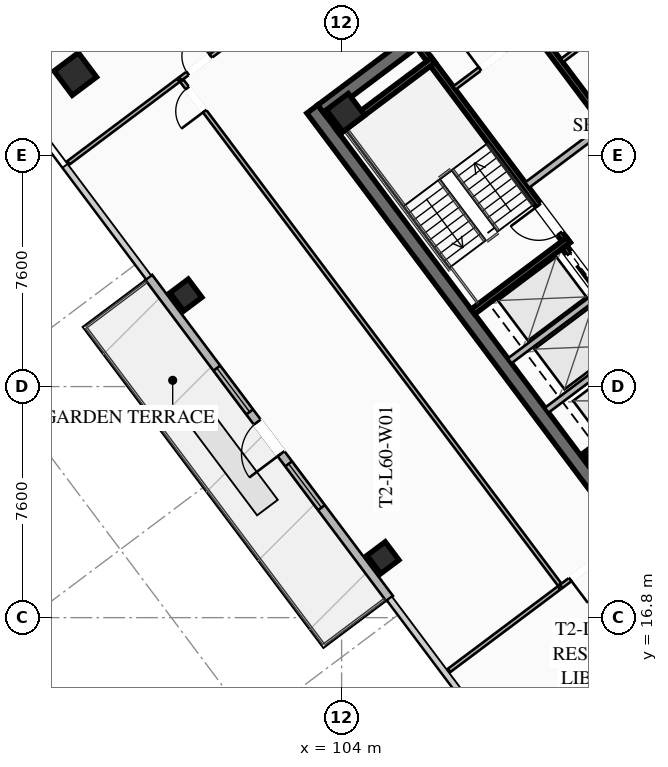
"""IFC4 building model, lengths in metres.
Left out: names, types, materials, properties, quantities, classifications, styles, units other than length and angle.
Written with IfcOpenShell. Run it as: python <this file> out.ifc"""

import sys

from ifc_helpers import new_model, si_unit, direction, frame, frame_2d, origin, origin_2d, place, context, subcontext, project, spatial, rectangle, hollow_rectangle, extrude, element, fill, save


model = new_model("IFC4")
c1 = context("Model", 3, precision=1e-05, world=origin(), true_north=direction((0.0, 1.0)))
c2 = subcontext(c1, "Body", "Model", "MODEL_VIEW")
j1 = project(units=[si_unit("LENGTHUNIT", "METRE"), si_unit("PLANEANGLEUNIT", "RADIAN")], contexts=[c1])
p1 = place(None, origin())
s1 = spatial("IfcSite", under=j1, at=p1, CompositionType="ELEMENT")
p2 = place(p1, origin())
s2 = spatial("IfcBuilding", under=s1, at=p2, CompositionType="ELEMENT")
p3 = place(p2, frame((0.0, 0.0, 221.95)))
s3 = spatial("IfcBuildingStorey", under=s2, at=p3, CompositionType="ELEMENT", Elevation=221.95)
p4 = place(p3, frame((112.396, 21.047, 0.0), z_axis=(0.0, 0.0, 1.0), x_axis=(-0.600005007985, 0.799996243986, 0.0)))
e1 = element("IfcWall", 1, at=p4, inside=s3, PredefinedType="SHEAR", context=c2, shape_type="SweptSolid", body=[
    extrude(rectangle(XDim=15.6, YDim=0.45, at=frame_2d((7.8, 0.0))), origin(), (0.0, 0.0, 1.0), 3.55),
])
p5 = place(p3, frame((103.351, 33.482, 0.0), z_axis=(0.0, 0.0, 1.0), x_axis=(0.8, 0.6, 0.0)))
e2 = element("IfcWall", 2, at=p5, inside=s3, PredefinedType="SHEAR", context=c2, shape_type="SweptSolid", body=[
    extrude(rectangle(XDim=15.26, YDim=0.45, at=frame_2d((7.63, 0.0))), origin(), (0.0, 0.0, 1.0), 3.55),
])
p6 = place(p5, frame((4.68, 0.0, 0.0)))
e3 = element("IfcOpeningElement", 3, at=p6, cuts=e2, PredefinedType="OPENING", context=c2, shape_type="SweptSolid", body=[
    extrude(rectangle(XDim=1.25, YDim=2.25, at=frame_2d((0.625, 1.125))), frame((0.0, 0.235, 0.0), z_axis=(0.0, -1.0, 0.0), x_axis=(1.0, 0.0, 0.0)), (0.0, 0.0, 1.0), 0.47),
])
p7 = place(p5, frame((9.73, 0.0, 0.0)))
e4 = element("IfcOpeningElement", 4, at=p7, cuts=e2, PredefinedType="OPENING", context=c2, shape_type="SweptSolid", body=[
    extrude(rectangle(XDim=1.25, YDim=2.25, at=frame_2d((0.625, 1.125))), frame((0.0, 0.235, 0.0), z_axis=(0.0, -1.0, 0.0), x_axis=(1.0, 0.0, 0.0)), (0.0, 0.0, 1.0), 0.47),
])
for number, where, z_axis, x_axis in (
    (5, (112.59, 22.13, 0.0), (0.0, 0.0, 1.0), (0.8, 0.6, 0.0)),
    (6, (104.13, 33.41, 0.0), (0.0, 0.0, 1.0), (0.8, 0.6, 0.0)),
):
    element("IfcColumn", number, at=place(p3, frame(where, z_axis=z_axis, x_axis=x_axis)), inside=s3, PredefinedType="COLUMN", context=c2, shape_type="SweptSolid", body=[
        extrude(hollow_rectangle(XDim=0.9, YDim=0.9, WallThickness=0.04, at=origin_2d()), origin(), (0.0, 0.0, 1.0), 3.37),
    ])
p8 = place(p3, frame((95.24, 34.68, 0.0), z_axis=(0.0, 0.0, 1.0), x_axis=(0.799999996291, 0.600000004945, 0.0)))
e7 = element("IfcColumn", 7, at=p8, inside=s3, PredefinedType="COLUMN", context=c2, shape_type="SweptSolid", body=[
    extrude(hollow_rectangle(XDim=1.0, YDim=1.0, WallThickness=0.04, at=origin_2d()), origin(), (0.0, 0.0, 1.0), 3.37),
])
for number, where, z_axis, x_axis in (
    (8, (98.88, 27.41, 0.0), (0.0, 0.0, 1.0), (0.8, 0.6, 0.0)),
    (9, (105.36, 18.77, 0.0), (0.0, 0.0, 1.0), (0.8, 0.6, 0.0)),
):
    element("IfcColumn", number, at=place(p3, frame(where, z_axis=z_axis, x_axis=x_axis)), inside=s3, PredefinedType="COLUMN", context=c2, shape_type="SweptSolid", body=[
        extrude(hollow_rectangle(XDim=0.75, YDim=0.75, WallThickness=0.032, at=origin_2d()), origin(), (0.0, 0.0, 1.0), 3.37),
    ])
p9 = place(p3, frame((105.576, 17.432, 0.0), z_axis=(0.0, 0.0, 1.0), x_axis=(-0.599994081423, 0.800004438899, 0.0)))
e10 = element("IfcWall", 10, at=p9, inside=s3, PredefinedType="SOLIDWALL", context=c2, shape_type="SweptSolid", body=[
    extrude(rectangle(XDim=13.2, YDim=0.28, at=frame_2d((6.6, 0.0))), origin(), (0.0, 0.0, 1.0), 3.37),
])
p10 = place(p9, frame((5.95, 0.0, 0.0)))
e11 = element("IfcOpeningElement", 11, at=p10, cuts=e10, PredefinedType="OPENING", context=c2, shape_type="SweptSolid", body=[
    extrude(rectangle(XDim=1.3, YDim=2.15, at=frame_2d((0.65, 1.075))), frame((0.0, 0.15, 0.0), z_axis=(0.0, -1.0, 0.0), x_axis=(1.0, 0.0, 0.0)), (0.0, 0.0, 1.0), 0.3),
])
p11 = place(p9, frame((3.732, 0.0, 0.85)))
e12 = element("IfcOpeningElement", 12, at=p11, cuts=e10, PredefinedType="OPENING", context=c2, shape_type="SweptSolid", body=[
    extrude(rectangle(XDim=1.8, YDim=1.92, at=frame_2d((0.9, 0.96))), frame((0.0, 0.15, 0.0), z_axis=(0.0, -1.0, 0.0), x_axis=(1.0, 0.0, 0.0)), (0.0, 0.0, 1.0), 0.3),
])
p12 = place(p9, frame((7.668, 0.0, 0.85)))
e13 = element("IfcOpeningElement", 13, at=p12, cuts=e10, PredefinedType="OPENING", context=c2, shape_type="SweptSolid", body=[
    extrude(rectangle(XDim=1.8, YDim=1.92, at=frame_2d((0.9, 0.96))), frame((0.0, 0.15, 0.0), z_axis=(0.0, -1.0, 0.0), x_axis=(1.0, 0.0, 0.0)), (0.0, 0.0, 1.0), 0.3),
])
p13 = place(p3, frame((111.44, 29.08, 0.0), z_axis=(0.0, 0.0, 1.0), x_axis=(-0.59999041401, 0.800007189403, 0.0)))
e14 = element("IfcWall", 14, at=p13, inside=s3, PredefinedType="SHEAR", context=c2, shape_type="SweptSolid", body=[
    extrude(rectangle(XDim=8.15, YDim=0.2, at=frame_2d((4.075, 0.0))), origin(), (0.0, 0.0, 1.0), 3.37),
])
p14 = place(p13, frame((0.45, 0.0, 0.0)))
e15 = element("IfcOpeningElement", 15, at=p14, cuts=e14, PredefinedType="OPENING", context=c2, shape_type="SweptSolid", body=[
    extrude(rectangle(XDim=1.15, YDim=2.2, at=frame_2d((0.575, 1.1))), frame((0.0, 0.11, 0.0), z_axis=(0.0, -1.0, 0.0), x_axis=(1.0, 0.0, 0.0)), (0.0, 0.0, 1.0), 0.22),
])
for number, where, z_axis, x_axis in (
    (16, (108.316, 26.862, 0.0), (0.0, 0.0, 1.0), (0.8, 0.6, 0.0)),
    (17, (103.876, 32.782, 0.0), (0.0, 0.0, 1.0), (0.8, 0.6, 0.0)),
):
    element("IfcWall", number, at=place(p3, frame(where, z_axis=z_axis, x_axis=x_axis)), inside=s3, PredefinedType="SHEAR", context=c2, shape_type="SweptSolid", body=[
        extrude(rectangle(XDim=3.93, YDim=0.2, at=frame_2d((1.965, 0.0))), origin(), (0.0, 0.0, 1.0), 3.37),
    ])
p15 = place(p3, frame((118.058, 25.856, 0.0), z_axis=(0.0, 0.0, 1.0), x_axis=(-0.600002657301, 0.799998007018, 0.0)))
e18 = element("IfcWall", 18, at=p15, inside=s3, PredefinedType="SHEAR", context=c2, shape_type="SweptSolid", body=[
    extrude(rectangle(XDim=14.7, YDim=0.2, at=frame_2d((7.35, 0.0))), origin(), (0.0, 0.0, 1.0), 3.37),
])
p16 = place(p3, frame((110.104, 31.028, 0.0), z_axis=(0.0, 0.0, 1.0), x_axis=(0.800018601094, 0.59997519774, 0.0)))
e19 = element("IfcWall", 19, at=p16, inside=s3, PredefinedType="SOLIDWALL", context=c2, shape_type="SweptSolid", body=[
    extrude(rectangle(XDim=3.15, YDim=0.22, at=frame_2d((1.575, 0.0))), origin(), (0.0, 0.0, 1.0), 2.723),
])
p17 = place(p3, frame((115.25, 23.75, 0.0), z_axis=(0.0, 0.0, 1.0), x_axis=(-0.599994036198, 0.800004472816, 0.0)))
e20 = element("IfcWall", 20, at=p17, inside=s3, PredefinedType="SHEAR", context=c2, shape_type="SweptSolid", body=[
    extrude(rectangle(XDim=6.55, YDim=0.2, at=frame_2d((3.275, 0.0))), origin(), (0.0, 0.0, 1.0), 3.37),
])
p18 = place(p17, frame((4.975, 0.0, 0.0)))
e21 = element("IfcOpeningElement", 21, at=p18, cuts=e20, PredefinedType="OPENING", context=c2, shape_type="SweptSolid", body=[
    extrude(rectangle(XDim=1.3, YDim=2.25, at=frame_2d((0.65, 1.125))), frame((0.0, 0.11, 0.0), z_axis=(0.0, -1.0, 0.0), x_axis=(1.0, 0.0, 0.0)), (0.0, 0.0, 1.0), 0.22),
])
p19 = place(p17, frame((2.975, 0.0, 0.0)))
e22 = element("IfcOpeningElement", 22, at=p19, cuts=e20, PredefinedType="OPENING", context=c2, shape_type="SweptSolid", body=[
    extrude(rectangle(XDim=1.3, YDim=2.25, at=frame_2d((0.65, 1.125))), frame((0.0, 0.11, 0.0), z_axis=(0.0, -1.0, 0.0), x_axis=(1.0, 0.0, 0.0)), (0.0, 0.0, 1.0), 0.22),
])
p20 = place(p17, frame((0.775, 0.0, 0.0)))
e23 = element("IfcOpeningElement", 23, at=p20, cuts=e20, PredefinedType="OPENING", context=c2, shape_type="SweptSolid", body=[
    extrude(rectangle(XDim=1.3, YDim=2.25, at=frame_2d((0.65, 1.125))), frame((0.0, 0.11, 0.0), z_axis=(0.0, -1.0, 0.0), x_axis=(1.0, 0.0, 0.0)), (0.0, 0.0, 1.0), 0.22),
])
for number, where, z_axis, x_axis in (
    (24, (110.746, 23.622, 0.0), (0.0, 0.0, 1.0), (0.8, 0.6, 0.0)),
    (25, (109.528, 25.246, 0.0), (0.0, 0.0, 1.0), (0.8, 0.6, 0.0)),
):
    element("IfcWall", number, at=place(p3, frame(where, z_axis=z_axis, x_axis=x_axis)), inside=s3, PredefinedType="SOLIDWALL", context=c2, shape_type="SweptSolid", body=[
        extrude(rectangle(XDim=3.58, YDim=0.2, at=frame_2d((1.79, 0.0))), origin(), (0.0, 0.0, 1.0), 3.37),
    ])
p21 = place(p3, frame((107.71, 34.22, 0.0), z_axis=(0.0, 0.0, 1.0), x_axis=(0.799981399002, 0.60002480053, 0.0)))
e26 = element("IfcWall", 26, at=p21, inside=s3, PredefinedType="PARTITIONING", context=c2, shape_type="SweptSolid", body=[
    extrude(rectangle(XDim=3.15, YDim=0.135, at=frame_2d((1.575, 0.0))), origin(), (0.0, 0.0, 1.0), 2.723),
])
p22 = place(p21, frame((1.05, 0.0, 0.0)))
e27 = element("IfcOpeningElement", 27, at=p22, cuts=e26, PredefinedType="OPENING", context=c2, shape_type="SweptSolid", body=[
    extrude(rectangle(XDim=1.05, YDim=2.2, at=frame_2d((0.525, 1.1))), frame((0.0, 0.077, 0.0), z_axis=(0.0, -1.0, 0.0), x_axis=(1.0, 0.0, 0.0)), (0.0, 0.0, 1.0), 0.155),
])
p23 = place(p3, frame((115.11, 33.27, 0.0), z_axis=(0.0, 0.0, 1.0), x_axis=(-0.600011160345, 0.79999162962, 0.0)))
e28 = element("IfcWall", 28, at=p23, inside=s3, PredefinedType="SOLIDWALL", context=c2, shape_type="SweptSolid", body=[
    extrude(rectangle(XDim=7.0, YDim=0.2, at=frame_2d((3.5, 0.0))), origin(), (0.0, 0.0, 1.0), 2.723),
])
p24 = place(p23, frame((0.85, 0.0, 0.0)))
e29 = element("IfcOpeningElement", 29, at=p24, cuts=e28, PredefinedType="OPENING", context=c2, shape_type="SweptSolid", body=[
    extrude(rectangle(XDim=0.95, YDim=2.05, at=frame_2d((0.475, 1.025))), frame((0.0, 0.11, 0.0), z_axis=(0.0, -1.0, 0.0), x_axis=(1.0, 0.0, 0.0)), (0.0, 0.0, 1.0), 0.22),
])
p25 = place(p23, frame((4.85, 0.0, 0.0)))
e30 = element("IfcOpeningElement", 30, at=p25, cuts=e28, PredefinedType="OPENING", context=c2, shape_type="SweptSolid", body=[
    extrude(rectangle(XDim=0.95, YDim=2.05, at=frame_2d((0.475, 1.025))), frame((0.0, 0.11, 0.0), z_axis=(0.0, -1.0, 0.0), x_axis=(1.0, 0.0, 0.0)), (0.0, 0.0, 1.0), 0.22),
])
p26 = place(p3, frame((111.246, 35.122, 0.0), z_axis=(0.0, 0.0, 1.0), x_axis=(0.8, 0.6, 0.0)))
e31 = element("IfcWall", 31, at=p26, inside=s3, PredefinedType="PARTITIONING", context=c2, shape_type="SweptSolid", body=[
    extrude(rectangle(XDim=1.88, YDim=0.135, at=frame_2d((0.94, 0.0))), origin(), (0.0, 0.0, 1.0), 2.723),
])
p27 = place(p3, frame((98.696, 34.522, 0.0), z_axis=(0.0, 0.0, 1.0), x_axis=(0.799998778269, 0.600001628972, 0.0)))
e32 = element("IfcWall", 32, at=p27, inside=s3, PredefinedType="PARTITIONING", context=c2, shape_type="SweptSolid", body=[
    extrude(rectangle(XDim=23.98, YDim=0.135, at=frame_2d((11.99, 0.0))), origin(), (0.0, 0.0, 1.0), 2.723),
])
p28 = place(p27, frame((0.3, 0.0, 0.0)))
e33 = element("IfcOpeningElement", 33, at=p28, cuts=e32, PredefinedType="OPENING", context=c2, shape_type="SweptSolid", body=[
    extrude(rectangle(XDim=0.95, YDim=2.05, at=frame_2d((0.475, 1.025))), frame((0.0, 0.077, 0.0), z_axis=(0.0, -1.0, 0.0), x_axis=(1.0, 0.0, 0.0)), (0.0, 0.0, 1.0), 0.155),
])
p29 = place(p27, frame((10.503, 0.0, 0.0)))
e34 = element("IfcOpeningElement", 34, at=p29, cuts=e32, PredefinedType="OPENING", context=c2, shape_type="SweptSolid", body=[
    extrude(rectangle(XDim=0.95, YDim=2.05, at=frame_2d((0.475, 1.025))), frame((0.0, 0.077, 0.0), z_axis=(0.0, -1.0, 0.0), x_axis=(1.0, 0.0, 0.0)), (0.0, 0.0, 1.0), 0.155),
])
p30 = place(p27, frame((14.308, 0.0, 0.0)))
e35 = element("IfcOpeningElement", 35, at=p30, cuts=e32, PredefinedType="OPENING", context=c2, shape_type="SweptSolid", body=[
    extrude(rectangle(XDim=0.95, YDim=2.05, at=frame_2d((0.475, 1.025))), frame((0.0, 0.077, 0.0), z_axis=(0.0, -1.0, 0.0), x_axis=(1.0, 0.0, 0.0)), (0.0, 0.0, 1.0), 0.155),
])
p31 = place(p27, frame((22.73, 0.0, 0.0)))
e36 = element("IfcOpeningElement", 36, at=p31, cuts=e32, PredefinedType="OPENING", context=c2, shape_type="SweptSolid", body=[
    extrude(rectangle(XDim=0.95, YDim=2.05, at=frame_2d((0.475, 1.025))), frame((0.0, 0.077, 0.0), z_axis=(0.0, -1.0, 0.0), x_axis=(1.0, 0.0, 0.0)), (0.0, 0.0, 1.0), 0.155),
])
p32 = place(p3, frame((123.322, 26.904, 0.0), z_axis=(0.0, 0.0, 1.0), x_axis=(-0.799996127317, -0.600005163543, 0.0)))
e37 = element("IfcWall", 37, at=p32, inside=s3, PredefinedType="PARTITIONING", context=c2, shape_type="SweptSolid", body=[
    extrude(rectangle(XDim=15.13, YDim=0.135, at=frame_2d((7.565, 0.0))), origin(), (0.0, 0.0, 1.0), 2.723),
])
p33 = place(p32, frame((13.8, 0.0, 0.0)))
e38 = element("IfcOpeningElement", 38, at=p33, cuts=e37, PredefinedType="OPENING", context=c2, shape_type="SweptSolid", body=[
    extrude(rectangle(XDim=0.95, YDim=2.05, at=frame_2d((0.475, 1.025))), frame((0.0, 0.077, 0.0), z_axis=(0.0, -1.0, 0.0), x_axis=(1.0, 0.0, 0.0)), (0.0, 0.0, 1.0), 0.155),
])
p34 = place(p32, frame((3.672, 0.0, 0.0)))
e39 = element("IfcOpeningElement", 39, at=p34, cuts=e37, PredefinedType="OPENING", context=c2, shape_type="SweptSolid", body=[
    extrude(rectangle(XDim=0.95, YDim=2.05, at=frame_2d((0.475, 1.025))), frame((0.0, 0.077, 0.0), z_axis=(0.0, -1.0, 0.0), x_axis=(1.0, 0.0, 0.0)), (0.0, 0.0, 1.0), 0.155),
])
p35 = place(p3, frame((111.17, 17.89, 0.0), z_axis=(0.0, 0.0, 1.0), x_axis=(-0.599998113842, 0.800001414615, 0.0)))
e40 = element("IfcWall", 40, at=p35, inside=s3, PredefinedType="PARTITIONING", context=c2, shape_type="SweptSolid", body=[
    extrude(rectangle(XDim=20.71, YDim=0.135, at=frame_2d((10.355, 0.0))), origin(), (0.0, 0.0, 1.0), 2.723),
])
p36 = place(p35, frame((19.46, 0.0, 0.0)))
e41 = element("IfcOpeningElement", 41, at=p36, cuts=e40, PredefinedType="OPENING", context=c2, shape_type="SweptSolid", body=[
    extrude(rectangle(XDim=0.95, YDim=2.05, at=frame_2d((0.475, 1.025))), frame((0.0, 0.077, 0.0), z_axis=(0.0, -1.0, 0.0), x_axis=(1.0, 0.0, 0.0)), (0.0, 0.0, 1.0), 0.155),
])
for number, where, z_axis, x_axis in (
    (42, (98.632, 34.474, 0.0), (0.0, 0.0, 1.0), (-0.8, -0.6, 0.0)),
    (43, (107.538, 15.066, 0.0), (0.0, 0.0, 1.0), (0.8, 0.6, 0.0)),
):
    element("IfcWall", number, at=place(p3, frame(where, z_axis=z_axis, x_axis=x_axis)), inside=s3, PredefinedType="PARTITIONING", context=c2, shape_type="SweptSolid", body=[
        extrude(rectangle(XDim=4.52, YDim=0.135, at=frame_2d((2.26, 0.0))), origin(), (0.0, 0.0, 1.0), 2.723),
    ])
p37 = place(p10, origin())
e44 = element("IfcDoor", 44, at=p37, inside=s3, OperationType="SINGLE_SWING_LEFT", PredefinedType="DOOR", context=c2, shape_type="SweptSolid", body=[
    extrude(rectangle(XDim=1.3, YDim=2.15, at=frame_2d((0.65, 1.075))), frame((0.0, 0.025, 0.0), z_axis=(0.0, -1.0, 0.0), x_axis=(1.0, 0.0, 0.0)), (0.0, 0.0, 1.0), 0.05),
])
fill(e11, e44)
p38 = place(p11, origin())
e45 = element("IfcWindow", 45, at=p38, inside=s3, PartitioningType="SINGLE_PANEL", PredefinedType="WINDOW", context=c2, shape_type="SweptSolid", body=[
    extrude(rectangle(XDim=1.8, YDim=1.92, at=frame_2d((0.9, 0.96))), frame((0.0, 0.03, 0.0), z_axis=(0.0, -1.0, 0.0), x_axis=(1.0, 0.0, 0.0)), (0.0, 0.0, 1.0), 0.06),
])
fill(e12, e45)
p39 = place(p12, origin())
e46 = element("IfcWindow", 46, at=p39, inside=s3, PartitioningType="SINGLE_PANEL", PredefinedType="WINDOW", context=c2, shape_type="SweptSolid", body=[
    extrude(rectangle(XDim=1.8, YDim=1.92, at=frame_2d((0.9, 0.96))), frame((0.0, 0.03, 0.0), z_axis=(0.0, -1.0, 0.0), x_axis=(1.0, 0.0, 0.0)), (0.0, 0.0, 1.0), 0.06),
])
fill(e13, e46)
p40 = place(p14, origin())
e47 = element("IfcDoor", 47, at=p40, inside=s3, OperationType="SINGLE_SWING_RIGHT", PredefinedType="DOOR", context=c2, shape_type="SweptSolid", body=[
    extrude(rectangle(XDim=1.15, YDim=2.2, at=frame_2d((0.575, 1.1))), frame((0.0, 0.025, 0.0), z_axis=(0.0, -1.0, 0.0), x_axis=(1.0, 0.0, 0.0)), (0.0, 0.0, 1.0), 0.05),
])
fill(e15, e47)
p41 = place(p22, origin())
e48 = element("IfcDoor", 48, at=p41, inside=s3, OperationType="SINGLE_SWING_LEFT", PredefinedType="DOOR", context=c2, shape_type="SweptSolid", body=[
    extrude(rectangle(XDim=1.05, YDim=2.2, at=frame_2d((0.525, 1.1))), frame((0.0, 0.025, 0.0), z_axis=(0.0, -1.0, 0.0), x_axis=(1.0, 0.0, 0.0)), (0.0, 0.0, 1.0), 0.05),
])
fill(e27, e48)
p42 = place(p28, origin())
e49 = element("IfcDoor", 49, at=p42, inside=s3, OperationType="SINGLE_SWING_RIGHT", PredefinedType="DOOR", context=c2, shape_type="SweptSolid", body=[
    extrude(rectangle(XDim=0.95, YDim=2.05, at=frame_2d((0.475, 1.025))), frame((0.0, 0.025, 0.0), z_axis=(0.0, -1.0, 0.0), x_axis=(1.0, 0.0, 0.0)), (0.0, 0.0, 1.0), 0.05),
])
fill(e33, e49)
p43 = place(p33, origin())
e50 = element("IfcDoor", 50, at=p43, inside=s3, OperationType="SINGLE_SWING_RIGHT", PredefinedType="DOOR", context=c2, shape_type="SweptSolid", body=[
    extrude(rectangle(XDim=0.95, YDim=2.05, at=frame_2d((0.475, 1.025))), frame((0.0, 0.025, 0.0), z_axis=(0.0, -1.0, 0.0), x_axis=(1.0, 0.0, 0.0)), (0.0, 0.0, 1.0), 0.05),
])
fill(e38, e50)
p44 = place(p36, origin())
e51 = element("IfcDoor", 51, at=p44, inside=s3, OperationType="SINGLE_SWING_LEFT", PredefinedType="DOOR", context=c2, shape_type="SweptSolid", body=[
    extrude(rectangle(XDim=0.95, YDim=2.05, at=frame_2d((0.475, 1.025))), frame((0.0, 0.025, 0.0), z_axis=(0.0, -1.0, 0.0), x_axis=(1.0, 0.0, 0.0)), (0.0, 0.0, 1.0), 0.05),
])
fill(e41, e51)
p45 = place(p18, origin())
e52 = element("IfcDoor", 52, at=p45, inside=s3, OperationType="SLIDING_TO_LEFT", PredefinedType="DOOR", context=c2, shape_type="SweptSolid", body=[
    extrude(rectangle(XDim=1.3, YDim=2.25, at=frame_2d((0.65, 1.125))), frame((0.0, 0.025, 0.0), z_axis=(0.0, -1.0, 0.0), x_axis=(1.0, 0.0, 0.0)), (0.0, 0.0, 1.0), 0.05),
])
fill(e21, e52)
save(model, sys.argv[1])
